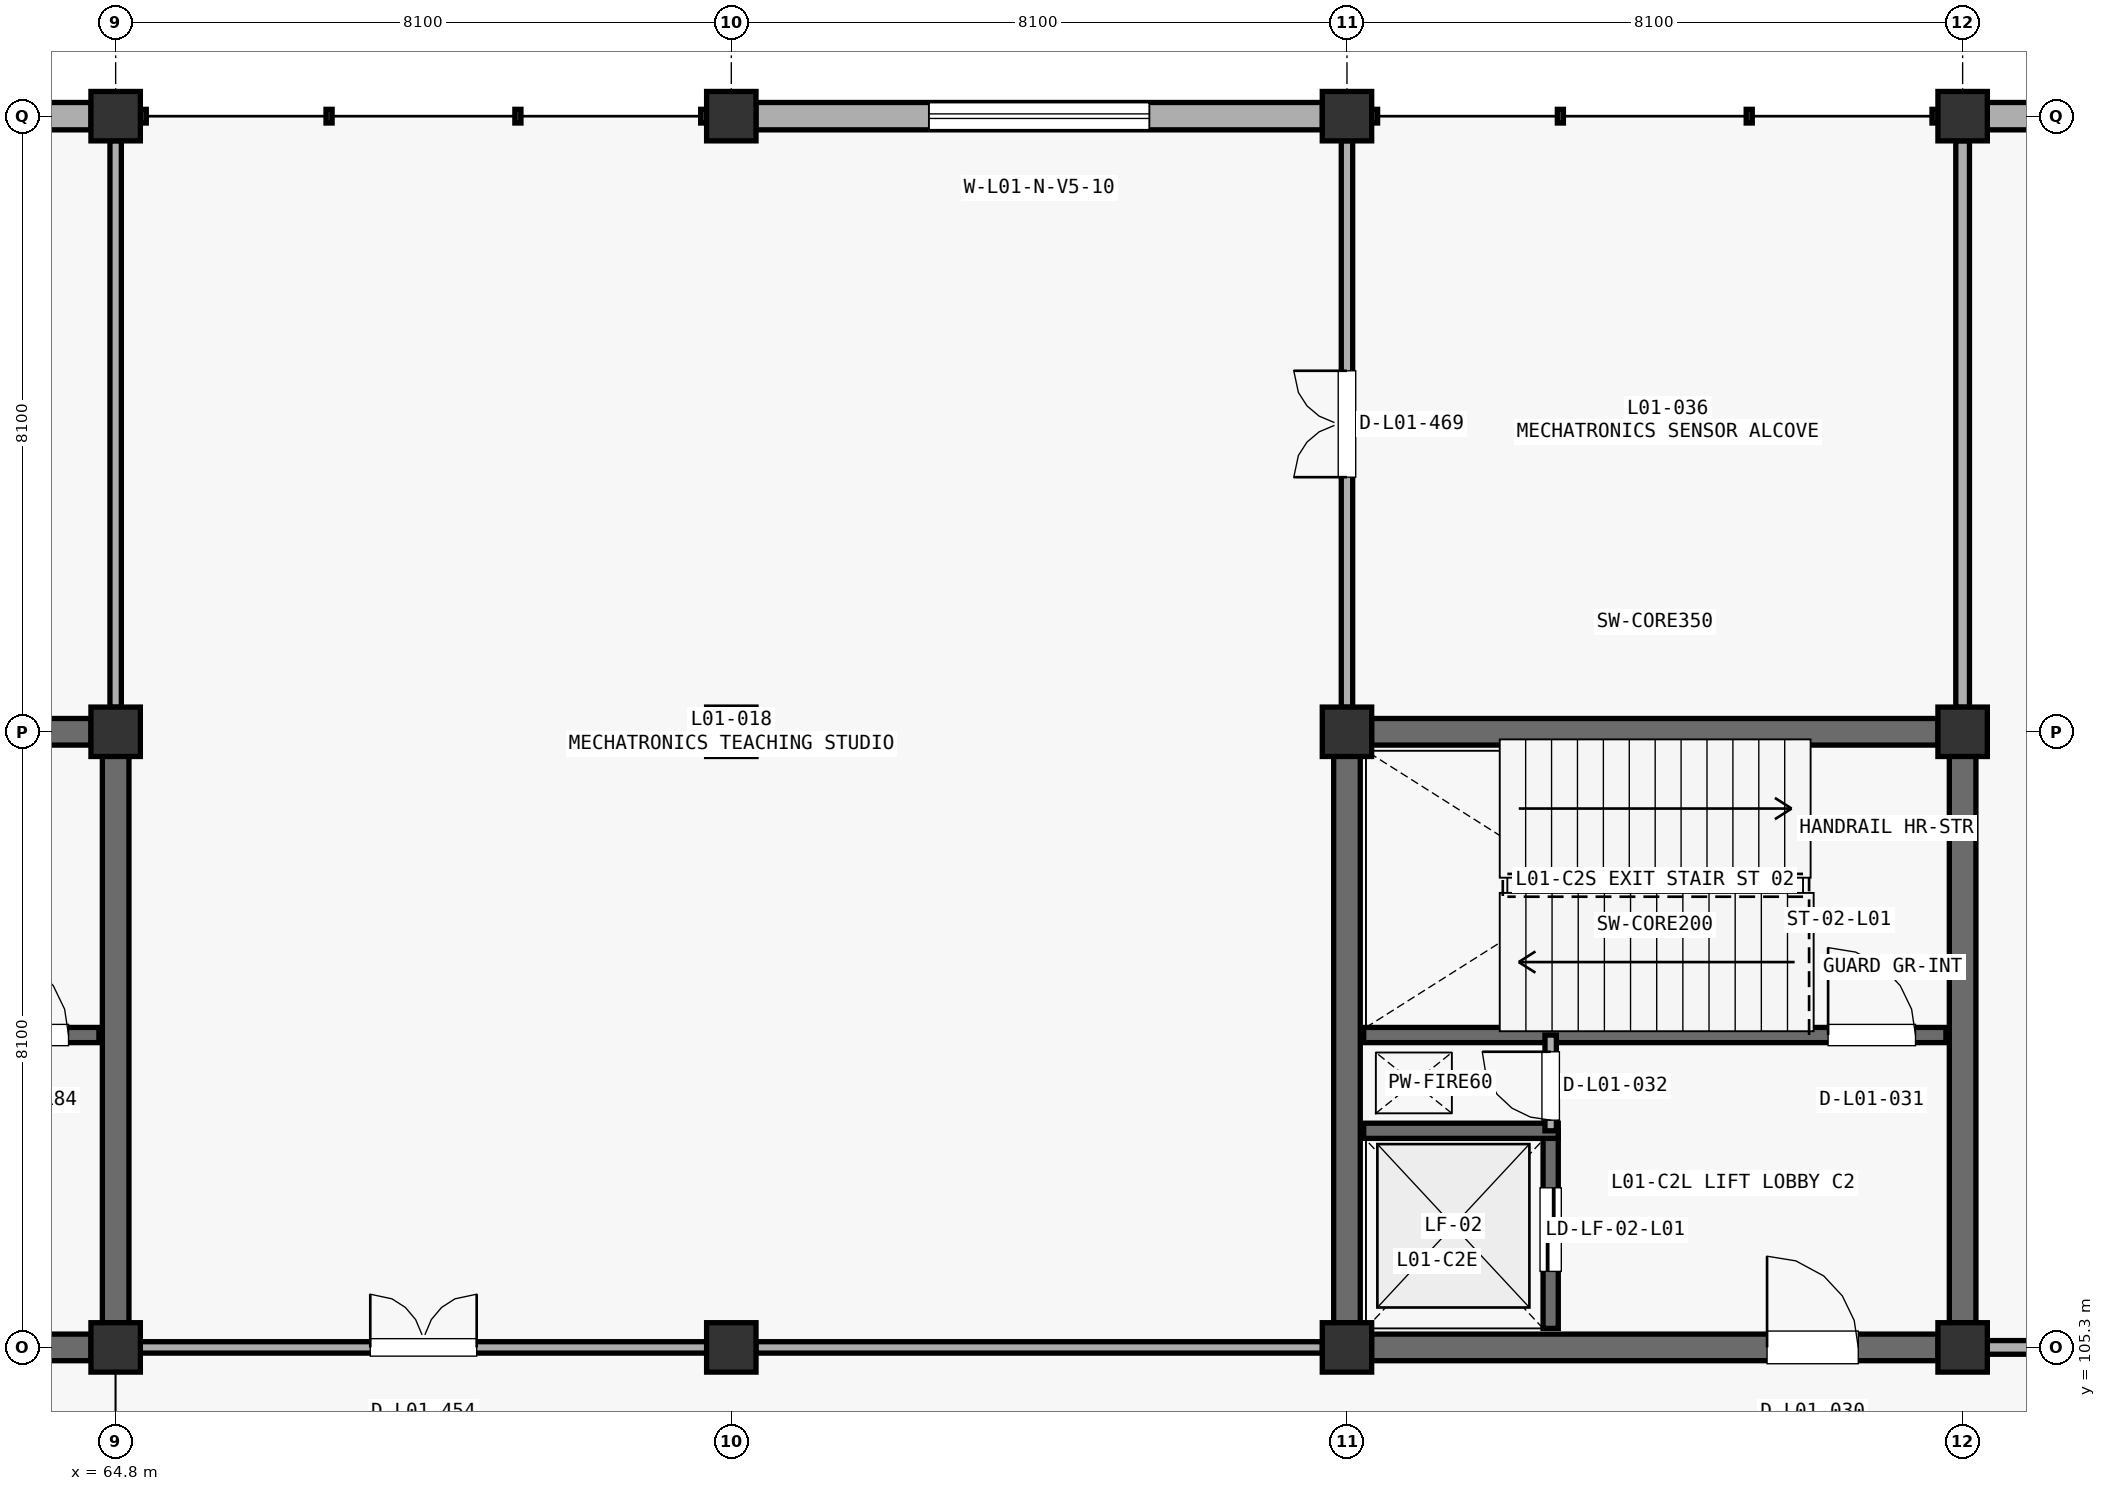
"""IFC4 building model, lengths in metres.
Left out: names, types, materials, properties, quantities, classifications, styles, units other than length and angle.
Written with IfcOpenShell. Run it as: python <this file> out.ifc"""

import sys

from ifc_helpers import new_model, si_unit, direction, frame, frame_2d, origin, origin_2d, place, context, subcontext, project, spatial, rectangle, extrude, element, fill, save


model = new_model("IFC4")
c1 = context("Model", 3, precision=1e-05, world=origin(), true_north=direction((0.0, 1.0)))
c2 = subcontext(c1, "Body", "Model", "MODEL_VIEW")
j1 = project(units=[si_unit("LENGTHUNIT", "METRE"), si_unit("PLANEANGLEUNIT", "RADIAN")], contexts=[c1])
p1 = place(None, origin())
s1 = spatial("IfcSite", under=j1, at=p1, CompositionType="ELEMENT")
p2 = place(p1, origin())
s2 = spatial("IfcBuilding", under=s1, at=p2, CompositionType="ELEMENT")
p3 = place(p2, frame((0.0, 0.0, 5.1)))
s3 = spatial("IfcBuildingStorey", under=s2, at=p3, CompositionType="ELEMENT", Elevation=5.1)
for number, where, z_axis, x_axis in (
    (1, (64.8, 105.3, 0.0), (0.0, 0.0, 1.0), (1.0, 0.0, 0.0)),
    (2, (64.8, 113.4, 0.0), (0.0, 0.0, 1.0), (1.0, 0.0, 0.0)),
    (3, (64.8, 121.5, 0.0), (0.0, 0.0, 1.0), (1.0, 0.0, 0.0)),
    (4, (72.9, 105.3, 0.0), (0.0, 0.0, 1.0), (1.0, 0.0, 0.0)),
    (5, (72.9, 113.4, 0.0), (0.0, 0.0, 1.0), (1.0, 0.0, 0.0)),
    (6, (72.9, 121.5, 0.0), (0.0, 0.0, 1.0), (1.0, 0.0, 0.0)),
    (7, (81.0, 105.3, 0.0), (0.0, 0.0, 1.0), (1.0, 0.0, 0.0)),
    (8, (81.0, 113.4, 0.0), (0.0, 0.0, 1.0), (1.0, 0.0, 0.0)),
    (9, (81.0, 121.5, 0.0), (0.0, 0.0, 1.0), (1.0, 0.0, 0.0)),
    (10, (89.1, 105.3, 0.0), (0.0, 0.0, 1.0), (1.0, 0.0, 0.0)),
    (11, (89.1, 113.4, 0.0), (0.0, 0.0, 1.0), (1.0, 0.0, 0.0)),
    (12, (89.1, 121.5, 0.0), (0.0, 0.0, 1.0), (1.0, 0.0, 0.0)),
):
    element("IfcColumn", number, at=place(p3, frame(where, z_axis=z_axis, x_axis=x_axis)), inside=s3, PredefinedType="COLUMN", context=c2, shape_type="SweptSolid", body=[
        extrude(rectangle(XDim=0.65, YDim=0.65, at=origin_2d()), origin(), (0.0, 0.0, 1.0), 4.59),
    ])
p4 = place(p3, frame((57.023, 121.5, 0.0), z_axis=(0.0, 0.0, 1.0), x_axis=(1.0, 0.0, 0.0)))
e13 = element("IfcWall", 13, at=p4, inside=s3, PredefinedType="STANDARD", context=c2, shape_type="SweptSolid", body=[
    extrude(rectangle(XDim=7.454, YDim=0.36, at=frame_2d((3.727, 0.0))), origin(), (0.0, 0.0, 1.0), 3.302),
])
p5 = place(p4, frame((2.427, 0.0, 0.85)))
e14 = element("IfcOpeningElement", 14, at=p5, cuts=e13, PredefinedType="OPENING", context=c2, shape_type="SweptSolid", body=[
    extrude(rectangle(XDim=2.6, YDim=1.6, at=frame_2d((1.3, 0.8))), frame((0.0, 0.19, 0.0), z_axis=(0.0, -1.0, 0.0), x_axis=(1.0, 0.0, 0.0)), (0.0, 0.0, 1.0), 0.38),
])
p6 = place(p3, frame((73.223, 121.5, 0.0), z_axis=(0.0, 0.0, 1.0), x_axis=(1.0, 0.0, 0.0)))
e15 = element("IfcWall", 15, at=p6, inside=s3, PredefinedType="STANDARD", context=c2, shape_type="SweptSolid", body=[
    extrude(rectangle(XDim=7.454, YDim=0.36, at=frame_2d((3.727, 0.0))), origin(), (0.0, 0.0, 1.0), 3.837),
])
p7 = place(p6, frame((2.277, 0.0, 0.85)))
e16 = element("IfcOpeningElement", 16, at=p7, cuts=e15, PredefinedType="OPENING", context=c2, shape_type="SweptSolid", body=[
    extrude(rectangle(XDim=2.9, YDim=1.6, at=frame_2d((1.45, 0.8))), frame((0.0, 0.19, 0.0), z_axis=(0.0, -1.0, 0.0), x_axis=(1.0, 0.0, 0.0)), (0.0, 0.0, 1.0), 0.38),
])
p8 = place(p3, frame((89.423, 121.5, 0.0), z_axis=(0.0, 0.0, 1.0), x_axis=(1.0, 0.0, 0.0)))
e17 = element("IfcWall", 17, at=p8, inside=s3, PredefinedType="STANDARD", context=c2, shape_type="SweptSolid", body=[
    extrude(rectangle(XDim=7.454, YDim=0.36, at=frame_2d((3.727, 0.0))), origin(), (0.0, 0.0, 1.0), 3.402),
])
p9 = place(p8, frame((2.777, 0.0, 0.85)))
e18 = element("IfcOpeningElement", 18, at=p9, cuts=e17, PredefinedType="OPENING", context=c2, shape_type="SweptSolid", body=[
    extrude(rectangle(XDim=1.9, YDim=1.85, at=frame_2d((0.95, 0.925))), frame((0.0, 0.19, 0.0), z_axis=(0.0, -1.0, 0.0), x_axis=(1.0, 0.0, 0.0)), (0.0, 0.0, 1.0), 0.38),
])
p10 = place(p3, frame((81.323, 113.4, 0.0), z_axis=(0.0, 0.0, 1.0), x_axis=(1.0, 0.0, 0.0)))
e19 = element("IfcWall", 19, at=p10, inside=s3, PredefinedType="SHEAR", context=c2, shape_type="SweptSolid", body=[
    extrude(rectangle(XDim=7.454, YDim=0.35, at=frame_2d((3.727, 0.0))), origin(), (0.0, 0.0, 1.0), 4.252),
])
for number, where, z_axis, x_axis in (
    (20, (81.0, 105.623, 0.0), (0.0, 0.0, 1.0), (0.0, 1.0, 0.0)),
    (21, (89.1, 105.623, 0.0), (0.0, 0.0, 1.0), (0.0, 1.0, 0.0)),
):
    element("IfcWall", number, at=place(p3, frame(where, z_axis=z_axis, x_axis=x_axis)), inside=s3, PredefinedType="SHEAR", context=c2, shape_type="SweptSolid", body=[
        extrude(rectangle(XDim=7.454, YDim=0.35, at=frame_2d((3.727, 0.0))), origin(), (0.0, 0.0, 1.0), 4.252),
    ])
p11 = place(p3, frame((81.323, 105.3, 0.0), z_axis=(0.0, 0.0, 1.0), x_axis=(1.0, 0.0, 0.0)))
e22 = element("IfcWall", 22, at=p11, inside=s3, PredefinedType="SHEAR", context=c2, shape_type="SweptSolid", body=[
    extrude(rectangle(XDim=7.454, YDim=0.35, at=frame_2d((3.727, 0.0))), origin(), (0.0, 0.0, 1.0), 4.252),
])
p12 = place(p11, frame((5.204, 0.0, 0.0)))
e23 = element("IfcOpeningElement", 23, at=p12, cuts=e22, PredefinedType="OPENING", context=c2, shape_type="SweptSolid", body=[
    extrude(rectangle(XDim=1.2, YDim=2.2, at=frame_2d((0.6, 1.1))), frame((0.0, 0.185, 0.0), z_axis=(0.0, -1.0, 0.0), x_axis=(1.0, 0.0, 0.0)), (0.0, 0.0, 1.0), 0.37),
])
p13 = place(p3, frame((81.22, 109.41, 0.0), z_axis=(0.0, 0.0, 1.0), x_axis=(1.0, 0.0, 0.0)))
e24 = element("IfcWall", 24, at=p13, inside=s3, PredefinedType="SHEAR", context=c2, shape_type="SweptSolid", body=[
    extrude(rectangle(XDim=7.66, YDim=0.2, at=frame_2d((3.83, 0.0))), origin(), (0.0, 0.0, 1.0), 4.252),
])
p14 = place(p13, frame((6.11, 0.0, 0.0)))
e25 = element("IfcOpeningElement", 25, at=p14, cuts=e24, PredefinedType="OPENING", context=c2, shape_type="SweptSolid", body=[
    extrude(rectangle(XDim=1.15, YDim=2.2, at=frame_2d((0.575, 1.1))), frame((0.0, 0.11, 0.0), z_axis=(0.0, -1.0, 0.0), x_axis=(1.0, 0.0, 0.0)), (0.0, 0.0, 1.0), 0.22),
])
p15 = place(p3, frame((83.68, 105.55, 0.0), z_axis=(0.0, 0.0, 1.0), x_axis=(0.0, 1.0, 0.0)))
e26 = element("IfcWall", 26, at=p15, inside=s3, PredefinedType="SHEAR", context=c2, shape_type="SweptSolid", body=[
    extrude(rectangle(XDim=2.6, YDim=0.2, at=frame_2d((1.3, 0.0))), origin(), (0.0, 0.0, 1.0), 4.252),
])
p16 = place(p15, frame((0.75, 0.0, 0.0)))
e27 = element("IfcOpeningElement", 27, at=p16, cuts=e26, PredefinedType="OPENING", context=c2, shape_type="SweptSolid", body=[
    extrude(rectangle(XDim=1.1, YDim=2.2, at=frame_2d((0.55, 1.1))), frame((0.0, 0.11, 0.0), z_axis=(0.0, -1.0, 0.0), x_axis=(1.0, 0.0, 0.0)), (0.0, 0.0, 1.0), 0.22),
])
p17 = place(p3, frame((81.22, 108.15, 0.0), z_axis=(0.0, 0.0, 1.0), x_axis=(1.0, 0.0, 0.0)))
e28 = element("IfcWall", 28, at=p17, inside=s3, PredefinedType="SHEAR", context=c2, shape_type="SweptSolid", body=[
    extrude(rectangle(XDim=2.56, YDim=0.2, at=frame_2d((1.28, 0.0))), origin(), (0.0, 0.0, 1.0), 4.252),
])
p18 = place(p3, frame((83.68, 108.15, 0.0), z_axis=(0.0, 0.0, 1.0), x_axis=(0.0, 1.0, 0.0)))
e29 = element("IfcWall", 29, at=p18, inside=s3, PredefinedType="PARTITIONING", context=c2, shape_type="SweptSolid", body=[
    extrude(rectangle(XDim=1.26, YDim=0.15, at=frame_2d((0.63, 0.0))), origin(), (0.0, 0.0, 1.0), 4.252),
])
p19 = place(p18, frame((0.14, 0.0, 0.0)))
e30 = element("IfcOpeningElement", 30, at=p19, cuts=e29, PredefinedType="OPENING", context=c2, shape_type="SweptSolid", body=[
    extrude(rectangle(XDim=0.9, YDim=2.15, at=frame_2d((0.45, 1.075))), frame((0.0, 0.085, 0.0), z_axis=(0.0, -1.0, 0.0), x_axis=(1.0, 0.0, 0.0)), (0.0, 0.0, 1.0), 0.17),
])
p20 = place(p3, frame((57.023, 113.4, 0.0), z_axis=(0.0, 0.0, 1.0), x_axis=(1.0, 0.0, 0.0)))
e31 = element("IfcWall", 31, at=p20, inside=s3, PredefinedType="SHEAR", context=c2, shape_type="SweptSolid", body=[
    extrude(rectangle(XDim=7.454, YDim=0.35, at=frame_2d((3.727, 0.0))), origin(), (0.0, 0.0, 1.0), 4.252),
])
p21 = place(p3, frame((64.8, 105.623, 0.0), z_axis=(0.0, 0.0, 1.0), x_axis=(0.0, 1.0, 0.0)))
e32 = element("IfcWall", 32, at=p21, inside=s3, PredefinedType="SHEAR", context=c2, shape_type="SweptSolid", body=[
    extrude(rectangle(XDim=7.454, YDim=0.35, at=frame_2d((3.727, 0.0))), origin(), (0.0, 0.0, 1.0), 4.252),
])
p22 = place(p3, frame((57.023, 105.3, 0.0), z_axis=(0.0, 0.0, 1.0), x_axis=(1.0, 0.0, 0.0)))
e33 = element("IfcWall", 33, at=p22, inside=s3, PredefinedType="SHEAR", context=c2, shape_type="SweptSolid", body=[
    extrude(rectangle(XDim=7.454, YDim=0.35, at=frame_2d((3.727, 0.0))), origin(), (0.0, 0.0, 1.0), 4.252),
])
p23 = place(p22, frame((5.204, 0.0, 0.0)))
e34 = element("IfcOpeningElement", 34, at=p23, cuts=e33, PredefinedType="OPENING", context=c2, shape_type="SweptSolid", body=[
    extrude(rectangle(XDim=1.2, YDim=2.2, at=frame_2d((0.6, 1.1))), frame((0.0, 0.185, 0.0), z_axis=(0.0, -1.0, 0.0), x_axis=(1.0, 0.0, 0.0)), (0.0, 0.0, 1.0), 0.37),
])
p24 = place(p3, frame((56.92, 109.41, 0.0), z_axis=(0.0, 0.0, 1.0), x_axis=(1.0, 0.0, 0.0)))
e35 = element("IfcWall", 35, at=p24, inside=s3, PredefinedType="SHEAR", context=c2, shape_type="SweptSolid", body=[
    extrude(rectangle(XDim=7.66, YDim=0.2, at=frame_2d((3.83, 0.0))), origin(), (0.0, 0.0, 1.0), 4.252),
])
p25 = place(p24, frame((6.11, 0.0, 0.0)))
e36 = element("IfcOpeningElement", 36, at=p25, cuts=e35, PredefinedType="OPENING", context=c2, shape_type="SweptSolid", body=[
    extrude(rectangle(XDim=1.15, YDim=2.2, at=frame_2d((0.575, 1.1))), frame((0.0, 0.11, 0.0), z_axis=(0.0, -1.0, 0.0), x_axis=(1.0, 0.0, 0.0)), (0.0, 0.0, 1.0), 0.22),
])
p26 = place(p3, frame((65.123, 105.3, 0.0), z_axis=(0.0, 0.0, 1.0), x_axis=(1.0, 0.0, 0.0)))
e37 = element("IfcWall", 37, at=p26, inside=s3, PredefinedType="PARTITIONING", context=c2, shape_type="SweptSolid", body=[
    extrude(rectangle(XDim=7.454, YDim=0.15, at=frame_2d((3.727, 0.0))), origin(), (0.0, 0.0, 1.0), 3.402),
])
p27 = place(p26, frame((3.027, 0.0, 0.0)))
e38 = element("IfcOpeningElement", 38, at=p27, cuts=e37, PredefinedType="OPENING", context=c2, shape_type="SweptSolid", body=[
    extrude(rectangle(XDim=1.4, YDim=2.2, at=frame_2d((0.7, 1.1))), frame((0.0, 0.085, 0.0), z_axis=(0.0, -1.0, 0.0), x_axis=(1.0, 0.0, 0.0)), (0.0, 0.0, 1.0), 0.17),
])
p28 = place(p3, frame((73.223, 105.3, 0.0), z_axis=(0.0, 0.0, 1.0), x_axis=(1.0, 0.0, 0.0)))
e39 = element("IfcWall", 39, at=p28, inside=s3, PredefinedType="PARTITIONING", context=c2, shape_type="SweptSolid", body=[
    extrude(rectangle(XDim=7.454, YDim=0.15, at=frame_2d((3.727, 0.0))), origin(), (0.0, 0.0, 1.0), 3.302),
])
p29 = place(p3, frame((81.0, 113.723, 0.0), z_axis=(0.0, 0.0, 1.0), x_axis=(0.0, 1.0, 0.0)))
e40 = element("IfcWall", 40, at=p29, inside=s3, PredefinedType="PARTITIONING", context=c2, shape_type="SweptSolid", body=[
    extrude(rectangle(XDim=7.454, YDim=0.15, at=frame_2d((3.727, 0.0))), origin(), (0.0, 0.0, 1.0), 3.602),
])
p30 = place(p29, frame((3.027, 0.0, 0.0)))
e41 = element("IfcOpeningElement", 41, at=p30, cuts=e40, PredefinedType="OPENING", context=c2, shape_type="SweptSolid", body=[
    extrude(rectangle(XDim=1.4, YDim=2.2, at=frame_2d((0.7, 1.1))), frame((0.0, 0.085, 0.0), z_axis=(0.0, -1.0, 0.0), x_axis=(1.0, 0.0, 0.0)), (0.0, 0.0, 1.0), 0.17),
])
p31 = place(p3, frame((64.8, 113.723, 0.0), z_axis=(0.0, 0.0, 1.0), x_axis=(0.0, 1.0, 0.0)))
e42 = element("IfcWall", 42, at=p31, inside=s3, PredefinedType="PARTITIONING", context=c2, shape_type="SweptSolid", body=[
    extrude(rectangle(XDim=7.454, YDim=0.15, at=frame_2d((3.727, 0.0))), origin(), (0.0, 0.0, 1.0), 3.652),
])
p32 = place(p3, frame((89.423, 105.3, 0.0), z_axis=(0.0, 0.0, 1.0), x_axis=(1.0, 0.0, 0.0)))
e43 = element("IfcWall", 43, at=p32, inside=s3, PredefinedType="PARTITIONING", context=c2, shape_type="SweptSolid", body=[
    extrude(rectangle(XDim=7.454, YDim=0.18, at=frame_2d((3.727, 0.0))), origin(), (0.0, 0.0, 1.0), 3.602),
])
p33 = place(p32, frame((3.227, 0.0, 0.0)))
e44 = element("IfcOpeningElement", 44, at=p33, cuts=e43, PredefinedType="OPENING", context=c2, shape_type="SweptSolid", body=[
    extrude(rectangle(XDim=1.0, YDim=2.15, at=frame_2d((0.5, 1.075))), frame((0.0, 0.1, 0.0), z_axis=(0.0, -1.0, 0.0), x_axis=(1.0, 0.0, 0.0)), (0.0, 0.0, 1.0), 0.2),
])
p34 = place(p3, frame((89.1, 113.723, 0.0), z_axis=(0.0, 0.0, 1.0), x_axis=(0.0, 1.0, 0.0)))
e45 = element("IfcWall", 45, at=p34, inside=s3, PredefinedType="PARTITIONING", context=c2, shape_type="SweptSolid", body=[
    extrude(rectangle(XDim=7.454, YDim=0.18, at=frame_2d((3.727, 0.0))), origin(), (0.0, 0.0, 1.0), 3.402),
])
p35 = place(p7, origin())
e46 = element("IfcWindow", 46, at=p35, inside=s3, PartitioningType="SINGLE_PANEL", PredefinedType="WINDOW", context=c2, shape_type="SweptSolid", body=[
    extrude(rectangle(XDim=2.9, YDim=1.6, at=frame_2d((1.45, 0.8))), frame((0.0, 0.03, 0.0), z_axis=(0.0, -1.0, 0.0), x_axis=(1.0, 0.0, 0.0)), (0.0, 0.0, 1.0), 0.06),
])
fill(e16, e46)
p36 = place(p12, origin())
e47 = element("IfcDoor", 47, at=p36, inside=s3, OperationType="SINGLE_SWING_LEFT", PredefinedType="DOOR", context=c2, shape_type="SweptSolid", body=[
    extrude(rectangle(XDim=1.2, YDim=2.2, at=frame_2d((0.6, 1.1))), frame((0.0, 0.025, 0.0), z_axis=(0.0, -1.0, 0.0), x_axis=(1.0, 0.0, 0.0)), (0.0, 0.0, 1.0), 0.05),
])
fill(e23, e47)
p37 = place(p14, origin())
e48 = element("IfcDoor", 48, at=p37, inside=s3, OperationType="SINGLE_SWING_LEFT", PredefinedType="DOOR", context=c2, shape_type="SweptSolid", body=[
    extrude(rectangle(XDim=1.15, YDim=2.2, at=frame_2d((0.575, 1.1))), frame((0.0, 0.025, 0.0), z_axis=(0.0, -1.0, 0.0), x_axis=(1.0, 0.0, 0.0)), (0.0, 0.0, 1.0), 0.05),
])
fill(e25, e48)
p38 = place(p16, origin())
e49 = element("IfcDoor", 49, at=p38, inside=s3, OperationType="SLIDING_TO_LEFT", PredefinedType="DOOR", context=c2, shape_type="SweptSolid", body=[
    extrude(rectangle(XDim=1.1, YDim=2.2, at=frame_2d((0.55, 1.1))), frame((0.0, 0.025, 0.0), z_axis=(0.0, -1.0, 0.0), x_axis=(1.0, 0.0, 0.0)), (0.0, 0.0, 1.0), 0.05),
])
fill(e27, e49)
p39 = place(p19, origin())
e50 = element("IfcDoor", 50, at=p39, inside=s3, OperationType="SINGLE_SWING_RIGHT", PredefinedType="DOOR", context=c2, shape_type="SweptSolid", body=[
    extrude(rectangle(XDim=0.9, YDim=2.15, at=frame_2d((0.45, 1.075))), frame((0.0, 0.025, 0.0), z_axis=(0.0, -1.0, 0.0), x_axis=(1.0, 0.0, 0.0)), (0.0, 0.0, 1.0), 0.05),
])
fill(e30, e50)
p40 = place(p25, origin())
e51 = element("IfcDoor", 51, at=p40, inside=s3, OperationType="SINGLE_SWING_LEFT", PredefinedType="DOOR", context=c2, shape_type="SweptSolid", body=[
    extrude(rectangle(XDim=1.15, YDim=2.2, at=frame_2d((0.575, 1.1))), frame((0.0, 0.025, 0.0), z_axis=(0.0, -1.0, 0.0), x_axis=(1.0, 0.0, 0.0)), (0.0, 0.0, 1.0), 0.05),
])
fill(e36, e51)
p41 = place(p27, origin())
e52 = element("IfcDoor", 52, at=p41, inside=s3, OperationType="DOUBLE_SWING_LEFT", PredefinedType="DOOR", context=c2, shape_type="SweptSolid", body=[
    extrude(rectangle(XDim=1.4, YDim=2.2, at=frame_2d((0.7, 1.1))), frame((0.0, 0.025, 0.0), z_axis=(0.0, -1.0, 0.0), x_axis=(1.0, 0.0, 0.0)), (0.0, 0.0, 1.0), 0.05),
])
fill(e38, e52)
p42 = place(p30, origin())
e53 = element("IfcDoor", 53, at=p42, inside=s3, OperationType="DOUBLE_SWING_LEFT", PredefinedType="DOOR", context=c2, shape_type="SweptSolid", body=[
    extrude(rectangle(XDim=1.4, YDim=2.2, at=frame_2d((0.7, 1.1))), frame((0.0, 0.025, 0.0), z_axis=(0.0, -1.0, 0.0), x_axis=(1.0, 0.0, 0.0)), (0.0, 0.0, 1.0), 0.05),
])
fill(e41, e53)
save(model, sys.argv[1])
